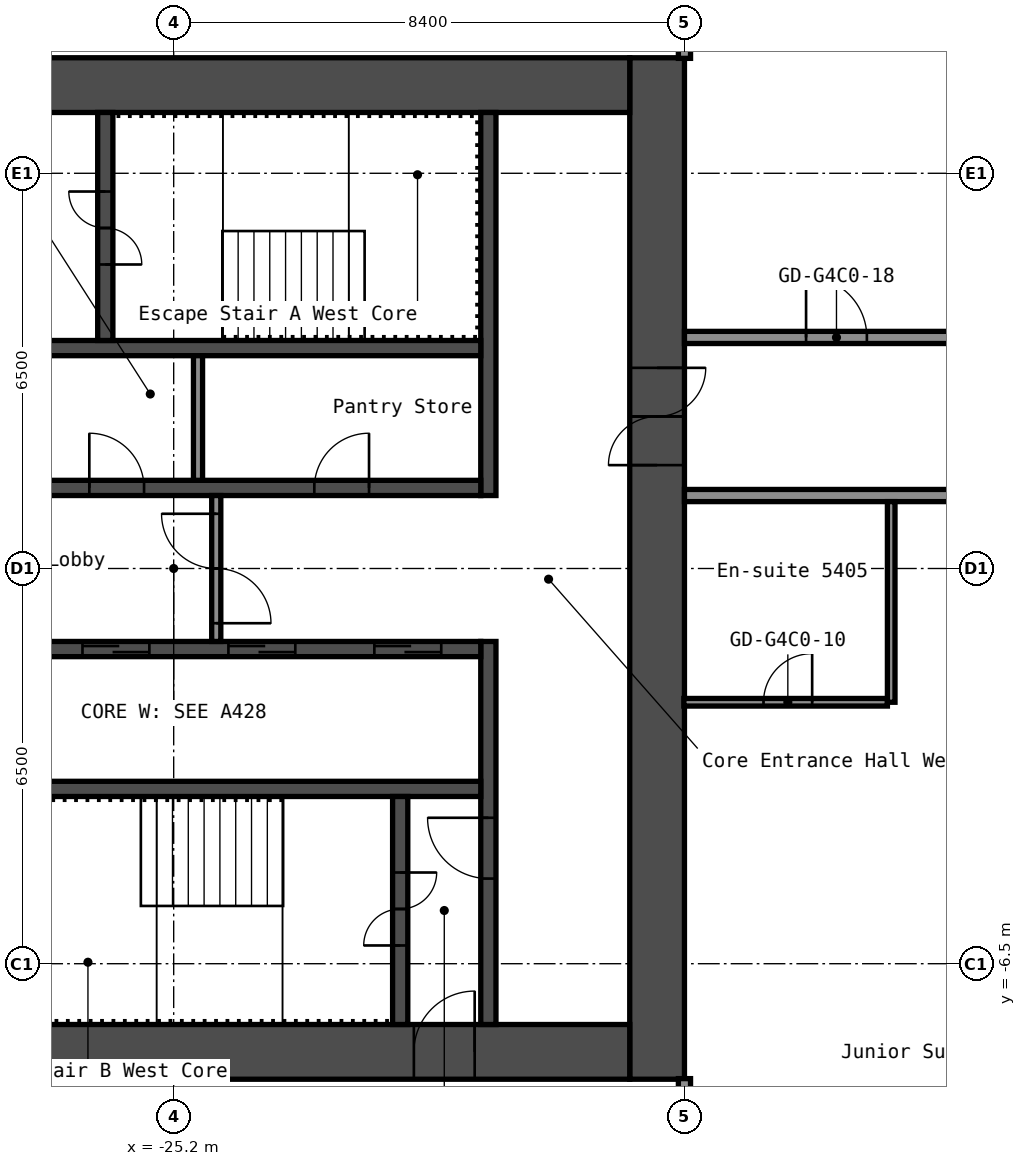
"""IFC4 building model, lengths in metres.
Left out: names, types, materials, properties, quantities, classifications, styles, units other than length and angle.
Written with IfcOpenShell. Run it as: python <this file> out.ifc"""

import sys

from ifc_helpers import new_model, si_unit, direction, frame, frame_2d, origin, place, context, subcontext, project, spatial, rectangle, extrude, element, fill, save


model = new_model("IFC4")
c1 = context("Model", 3, precision=1e-05, world=origin(), true_north=direction((0.0, 1.0)))
c2 = subcontext(c1, "Body", "Model", "MODEL_VIEW")
j1 = project(units=[si_unit("LENGTHUNIT", "METRE"), si_unit("PLANEANGLEUNIT", "RADIAN")], contexts=[c1])
p1 = place(None, origin())
s1 = spatial("IfcSite", under=j1, at=p1, CompositionType="ELEMENT")
p2 = place(p1, origin())
s2 = spatial("IfcBuilding", under=s1, at=p2, CompositionType="ELEMENT")
p3 = place(p2, frame((0.0, 0.0, 193.0)))
s3 = spatial("IfcBuildingStorey", under=s2, at=p3, CompositionType="ELEMENT", Elevation=193.0)
p4 = place(p3, frame((-17.25, -8.4, 0.0), z_axis=(0.0, 0.0, 1.0), x_axis=(0.0, 1.0, 0.0)))
e1 = element("IfcWall", 1, at=p4, inside=s3, PredefinedType="SHEAR", context=c2, shape_type="SweptSolid", body=[
    extrude(rectangle(XDim=16.8, YDim=0.9, at=frame_2d((8.4, 0.0))), origin(), (0.0, 0.0, 1.0), 2.75),
])
p5 = place(p4, frame((10.1, 0.0, 0.0)))
e2 = element("IfcOpeningElement", 2, at=p5, cuts=e1, PredefinedType="OPENING", context=c2, shape_type="SweptSolid", body=[
    extrude(rectangle(XDim=1.6, YDim=2.1, at=frame_2d((0.8, 1.05))), frame((0.0, 0.46, 0.0), z_axis=(0.0, -1.0, 0.0), x_axis=(1.0, 0.0, 0.0)), (0.0, 0.0, 1.0), 0.92),
])
p6 = place(p3, frame((-32.7, 7.95, 0.0), z_axis=(0.0, 0.0, 1.0), x_axis=(1.0, 0.0, 0.0)))
e3 = element("IfcWall", 3, at=p6, inside=s3, PredefinedType="SHEAR", context=c2, shape_type="SweptSolid", body=[
    extrude(rectangle(XDim=15.0, YDim=0.9, at=frame_2d((7.5, 0.0))), origin(), (0.0, 0.0, 1.0), 2.75),
])
p7 = place(p6, frame((3.4, 0.0, 0.0)))
e4 = element("IfcOpeningElement", 4, at=p7, cuts=e3, PredefinedType="OPENING", context=c2, shape_type="SweptSolid", body=[
    extrude(rectangle(XDim=1.2, YDim=2.1, at=frame_2d((0.6, 1.05))), frame((0.0, 0.46, 0.0), z_axis=(0.0, -1.0, 0.0), x_axis=(1.0, 0.0, 0.0)), (0.0, 0.0, 1.0), 0.92),
])
p8 = place(p6, frame((0.75, 0.0, 0.0)))
e5 = element("IfcOpeningElement", 5, at=p8, cuts=e3, PredefinedType="OPENING", context=c2, shape_type="SweptSolid", body=[
    extrude(rectangle(XDim=0.9, YDim=2.1, at=frame_2d((0.45, 1.05))), frame((0.0, 0.46, 0.0), z_axis=(0.0, -1.0, 0.0), x_axis=(1.0, 0.0, 0.0)), (0.0, 0.0, 1.0), 0.92),
])
p9 = place(p3, frame((-32.7, -7.95, 0.0), z_axis=(0.0, 0.0, 1.0), x_axis=(1.0, 0.0, 0.0)))
e6 = element("IfcWall", 6, at=p9, inside=s3, PredefinedType="SHEAR", context=c2, shape_type="SweptSolid", body=[
    extrude(rectangle(XDim=15.0, YDim=0.9, at=frame_2d((7.5, 0.0))), origin(), (0.0, 0.0, 1.0), 2.75),
])
p10 = place(p9, frame((11.45, 0.0, 0.0)))
e7 = element("IfcOpeningElement", 7, at=p10, cuts=e6, PredefinedType="OPENING", context=c2, shape_type="SweptSolid", body=[
    extrude(rectangle(XDim=1.0, YDim=2.1, at=frame_2d((0.5, 1.05))), frame((0.0, 0.46, 0.0), z_axis=(0.0, -1.0, 0.0), x_axis=(1.0, 0.0, 0.0)), (0.0, 0.0, 1.0), 0.92),
])
p11 = place(p3, frame((-20.025, 1.2, 0.0), z_axis=(0.0, 0.0, 1.0), x_axis=(0.0, 1.0, 0.0)))
e8 = element("IfcWall", 8, at=p11, inside=s3, PredefinedType="SHEAR", context=c2, shape_type="SweptSolid", body=[
    extrude(rectangle(XDim=6.3, YDim=0.25, at=frame_2d((3.15, 0.0))), origin(), (0.0, 0.0, 1.0), 2.75),
])
p12 = place(p3, frame((-20.025, -7.5, 0.0), z_axis=(0.0, 0.0, 1.0), x_axis=(0.0, 1.0, 0.0)))
e9 = element("IfcWall", 9, at=p12, inside=s3, PredefinedType="SHEAR", context=c2, shape_type="SweptSolid", body=[
    extrude(rectangle(XDim=6.3, YDim=0.25, at=frame_2d((3.15, 0.0))), origin(), (0.0, 0.0, 1.0), 2.75),
])
p13 = place(p12, frame((2.4, 0.0, 0.0)))
e10 = element("IfcOpeningElement", 10, at=p13, cuts=e9, PredefinedType="OPENING", context=c2, shape_type="SweptSolid", body=[
    extrude(rectangle(XDim=1.0, YDim=2.1, at=frame_2d((0.5, 1.05))), frame((0.0, 0.135, 0.0), z_axis=(0.0, -1.0, 0.0), x_axis=(1.0, 0.0, 0.0)), (0.0, 0.0, 1.0), 0.27),
])
p14 = place(p3, frame((-27.65, 1.325, 0.0), z_axis=(0.0, 0.0, 1.0), x_axis=(1.0, 0.0, 0.0)))
e11 = element("IfcWall", 11, at=p14, inside=s3, PredefinedType="SHEAR", context=c2, shape_type="SweptSolid", body=[
    extrude(rectangle(XDim=7.5, YDim=0.25, at=frame_2d((3.75, 0.0))), origin(), (0.0, 0.0, 1.0), 2.75),
])
p15 = place(p14, frame((4.762, 0.0, 0.0)))
e12 = element("IfcOpeningElement", 12, at=p15, cuts=e11, PredefinedType="OPENING", context=c2, shape_type="SweptSolid", body=[
    extrude(rectangle(XDim=0.9, YDim=2.1, at=frame_2d((0.45, 1.05))), frame((0.0, 0.135, 0.0), z_axis=(0.0, -1.0, 0.0), x_axis=(1.0, 0.0, 0.0)), (0.0, 0.0, 1.0), 0.27),
])
p16 = place(p14, frame((1.062, 0.0, 0.0)))
e13 = element("IfcOpeningElement", 13, at=p16, cuts=e11, PredefinedType="OPENING", context=c2, shape_type="SweptSolid", body=[
    extrude(rectangle(XDim=0.9, YDim=2.1, at=frame_2d((0.45, 1.05))), frame((0.0, 0.135, 0.0), z_axis=(0.0, -1.0, 0.0), x_axis=(1.0, 0.0, 0.0)), (0.0, 0.0, 1.0), 0.27),
])
p17 = place(p3, frame((-27.65, 3.625, 0.0), z_axis=(0.0, 0.0, 1.0), x_axis=(1.0, 0.0, 0.0)))
e14 = element("IfcWall", 14, at=p17, inside=s3, PredefinedType="SHEAR", context=c2, shape_type="SweptSolid", body=[
    extrude(rectangle(XDim=7.5, YDim=0.25, at=frame_2d((3.75, 0.0))), origin(), (0.0, 0.0, 1.0), 2.75),
])
p18 = place(p3, frame((-26.325, 3.75, 0.0), z_axis=(0.0, 0.0, 1.0), x_axis=(0.0, 1.0, 0.0)))
e15 = element("IfcWall", 15, at=p18, inside=s3, PredefinedType="SHEAR", context=c2, shape_type="SweptSolid", body=[
    extrude(rectangle(XDim=3.75, YDim=0.25, at=frame_2d((1.875, 0.0))), origin(), (0.0, 0.0, 1.0), 2.75),
])
p19 = place(p18, frame((1.25, 0.0, 0.0)))
e16 = element("IfcOpeningElement", 16, at=p19, cuts=e15, PredefinedType="OPENING", context=c2, shape_type="SweptSolid", body=[
    extrude(rectangle(XDim=1.2, YDim=2.1, at=frame_2d((0.6, 1.05))), frame((0.0, 0.135, 0.0), z_axis=(0.0, -1.0, 0.0), x_axis=(1.0, 0.0, 0.0)), (0.0, 0.0, 1.0), 0.27),
])
p20 = place(p3, frame((-27.65, -1.325, 0.0), z_axis=(0.0, 0.0, 1.0), x_axis=(1.0, 0.0, 0.0)))
e17 = element("IfcWall", 17, at=p20, inside=s3, PredefinedType="SHEAR", context=c2, shape_type="SweptSolid", body=[
    extrude(rectangle(XDim=7.5, YDim=0.25, at=frame_2d((3.75, 0.0))), origin(), (0.0, 0.0, 1.0), 2.75),
])
p21 = place(p20, frame((5.75, 0.0, 0.0)))
e18 = element("IfcOpeningElement", 18, at=p21, cuts=e17, PredefinedType="OPENING", context=c2, shape_type="SweptSolid", body=[
    extrude(rectangle(XDim=1.1, YDim=2.1, at=frame_2d((0.55, 1.05))), frame((0.0, 0.135, 0.0), z_axis=(0.0, -1.0, 0.0), x_axis=(1.0, 0.0, 0.0)), (0.0, 0.0, 1.0), 0.27),
])
p22 = place(p20, frame((3.35, 0.0, 0.0)))
e19 = element("IfcOpeningElement", 19, at=p22, cuts=e17, PredefinedType="OPENING", context=c2, shape_type="SweptSolid", body=[
    extrude(rectangle(XDim=1.1, YDim=2.1, at=frame_2d((0.55, 1.05))), frame((0.0, 0.135, 0.0), z_axis=(0.0, -1.0, 0.0), x_axis=(1.0, 0.0, 0.0)), (0.0, 0.0, 1.0), 0.27),
])
p23 = place(p20, frame((0.95, 0.0, 0.0)))
e20 = element("IfcOpeningElement", 20, at=p23, cuts=e17, PredefinedType="OPENING", context=c2, shape_type="SweptSolid", body=[
    extrude(rectangle(XDim=1.1, YDim=2.1, at=frame_2d((0.55, 1.05))), frame((0.0, 0.135, 0.0), z_axis=(0.0, -1.0, 0.0), x_axis=(1.0, 0.0, 0.0)), (0.0, 0.0, 1.0), 0.27),
])
p24 = place(p3, frame((-27.65, -3.625, 0.0), z_axis=(0.0, 0.0, 1.0), x_axis=(1.0, 0.0, 0.0)))
e21 = element("IfcWall", 21, at=p24, inside=s3, PredefinedType="SHEAR", context=c2, shape_type="SweptSolid", body=[
    extrude(rectangle(XDim=7.5, YDim=0.25, at=frame_2d((3.75, 0.0))), origin(), (0.0, 0.0, 1.0), 2.75),
])
p25 = place(p3, frame((-21.475, -7.5, 0.0), z_axis=(0.0, 0.0, 1.0), x_axis=(0.0, 1.0, 0.0)))
e22 = element("IfcWall", 22, at=p25, inside=s3, PredefinedType="SHEAR", context=c2, shape_type="SweptSolid", body=[
    extrude(rectangle(XDim=3.75, YDim=0.25, at=frame_2d((1.875, 0.0))), origin(), (0.0, 0.0, 1.0), 2.75),
])
p26 = place(p25, frame((1.3, 0.0, 0.0)))
e23 = element("IfcOpeningElement", 23, at=p26, cuts=e22, PredefinedType="OPENING", context=c2, shape_type="SweptSolid", body=[
    extrude(rectangle(XDim=1.2, YDim=2.1, at=frame_2d((0.6, 1.05))), frame((0.0, 0.135, 0.0), z_axis=(0.0, -1.0, 0.0), x_axis=(1.0, 0.0, 0.0)), (0.0, 0.0, 1.0), 0.27),
])
p27 = place(p3, frame((-24.5, -1.2, 0.0), z_axis=(0.0, 0.0, 1.0), x_axis=(0.0, 1.0, 0.0)))
e24 = element("IfcWall", 24, at=p27, inside=s3, PredefinedType="PARTITIONING", context=c2, shape_type="SweptSolid", body=[
    extrude(rectangle(XDim=2.4, YDim=0.15, at=frame_2d((1.2, 0.0))), origin(), (0.0, 0.0, 1.0), 2.75),
])
p28 = place(p27, frame((0.3, 0.0, 0.0)))
e25 = element("IfcOpeningElement", 25, at=p28, cuts=e24, PredefinedType="OPENING", context=c2, shape_type="SweptSolid", body=[
    extrude(rectangle(XDim=1.8, YDim=2.1, at=frame_2d((0.9, 1.05))), frame((0.0, 0.085, 0.0), z_axis=(0.0, -1.0, 0.0), x_axis=(1.0, 0.0, 0.0)), (0.0, 0.0, 1.0), 0.17),
])
p29 = place(p3, frame((-24.8, 1.45, 0.0), z_axis=(0.0, 0.0, 1.0), x_axis=(0.0, 1.0, 0.0)))
e26 = element("IfcWall", 26, at=p29, inside=s3, PredefinedType="PARTITIONING", context=c2, shape_type="SweptSolid", body=[
    extrude(rectangle(XDim=2.05, YDim=0.15, at=frame_2d((1.025, 0.0))), origin(), (0.0, 0.0, 1.0), 2.75),
])
p30 = place(p3, frame((-16.81, -2.2, 0.0), z_axis=(0.0, 0.0, 1.0), x_axis=(1.0, 0.0, 0.0)))
e27 = element("IfcWall", 27, at=p30, inside=s3, PredefinedType="PARTITIONING", context=c2, shape_type="SweptSolid", body=[
    extrude(rectangle(XDim=3.348, YDim=0.125, at=frame_2d((1.674, 0.0))), origin(), (0.0, 0.0, 1.0), 2.75),
])
p31 = place(p30, frame((1.31, 0.0, 0.0)))
e28 = element("IfcOpeningElement", 28, at=p31, cuts=e27, PredefinedType="OPENING", context=c2, shape_type="SweptSolid", body=[
    extrude(rectangle(XDim=0.8, YDim=2.1, at=frame_2d((0.4, 1.05))), frame((0.0, 0.073, 0.0), z_axis=(0.0, -1.0, 0.0), x_axis=(1.0, 0.0, 0.0)), (0.0, 0.0, 1.0), 0.145),
])
p32 = place(p3, frame((-16.8, 1.2, 0.0), z_axis=(0.0, 0.0, 1.0), x_axis=(1.0, 0.0, 0.0)))
e29 = element("IfcWall", 29, at=p32, inside=s3, PredefinedType="PARTITIONING", context=c2, shape_type="SweptSolid", body=[
    extrude(rectangle(XDim=33.6, YDim=0.2, at=frame_2d((16.8, 0.0))), origin(), (0.0, 0.0, 1.0), 2.75),
])
p33 = place(p32, frame((5.4, 0.0, 0.0)))
e30 = element("IfcOpeningElement", 30, at=p33, cuts=e29, PredefinedType="OPENING", context=c2, shape_type="SweptSolid", body=[
    extrude(rectangle(XDim=1.0, YDim=2.1, at=frame_2d((0.5, 1.05))), frame((0.0, 0.11, 0.0), z_axis=(0.0, -1.0, 0.0), x_axis=(1.0, 0.0, 0.0)), (0.0, 0.0, 1.0), 0.22),
])
p34 = place(p32, frame((11.25, 0.0, 0.0)))
e31 = element("IfcOpeningElement", 31, at=p34, cuts=e29, PredefinedType="OPENING", context=c2, shape_type="SweptSolid", body=[
    extrude(rectangle(XDim=1.0, YDim=2.1, at=frame_2d((0.5, 1.05))), frame((0.0, 0.11, 0.0), z_axis=(0.0, -1.0, 0.0), x_axis=(1.0, 0.0, 0.0)), (0.0, 0.0, 1.0), 0.22),
])
p35 = place(p32, frame((12.95, 0.0, 0.0)))
e32 = element("IfcOpeningElement", 32, at=p35, cuts=e29, PredefinedType="OPENING", context=c2, shape_type="SweptSolid", body=[
    extrude(rectangle(XDim=1.0, YDim=2.1, at=frame_2d((0.5, 1.05))), frame((0.0, 0.11, 0.0), z_axis=(0.0, -1.0, 0.0), x_axis=(1.0, 0.0, 0.0)), (0.0, 0.0, 1.0), 0.22),
])
p36 = place(p32, frame((18.7, 0.0, 0.0)))
e33 = element("IfcOpeningElement", 33, at=p36, cuts=e29, PredefinedType="OPENING", context=c2, shape_type="SweptSolid", body=[
    extrude(rectangle(XDim=0.9, YDim=2.1, at=frame_2d((0.45, 1.05))), frame((0.0, 0.11, 0.0), z_axis=(0.0, -1.0, 0.0), x_axis=(1.0, 0.0, 0.0)), (0.0, 0.0, 1.0), 0.22),
])
p37 = place(p32, frame((22.9, 0.0, 0.0)))
e34 = element("IfcOpeningElement", 34, at=p37, cuts=e29, PredefinedType="OPENING", context=c2, shape_type="SweptSolid", body=[
    extrude(rectangle(XDim=0.9, YDim=2.1, at=frame_2d((0.45, 1.05))), frame((0.0, 0.11, 0.0), z_axis=(0.0, -1.0, 0.0), x_axis=(1.0, 0.0, 0.0)), (0.0, 0.0, 1.0), 0.22),
])
p38 = place(p32, frame((28.05, 0.0, 0.0)))
e35 = element("IfcOpeningElement", 35, at=p38, cuts=e29, PredefinedType="OPENING", context=c2, shape_type="SweptSolid", body=[
    extrude(rectangle(XDim=1.0, YDim=2.1, at=frame_2d((0.5, 1.05))), frame((0.0, 0.11, 0.0), z_axis=(0.0, -1.0, 0.0), x_axis=(1.0, 0.0, 0.0)), (0.0, 0.0, 1.0), 0.22),
])
p39 = place(p32, frame((29.75, 0.0, 0.0)))
e36 = element("IfcOpeningElement", 36, at=p39, cuts=e29, PredefinedType="OPENING", context=c2, shape_type="SweptSolid", body=[
    extrude(rectangle(XDim=1.0, YDim=2.1, at=frame_2d((0.5, 1.05))), frame((0.0, 0.11, 0.0), z_axis=(0.0, -1.0, 0.0), x_axis=(1.0, 0.0, 0.0)), (0.0, 0.0, 1.0), 0.22),
])
p40 = place(p3, frame((-16.8, 3.8, 0.0), z_axis=(0.0, 0.0, 1.0), x_axis=(1.0, 0.0, 0.0)))
e37 = element("IfcWall", 37, at=p40, inside=s3, PredefinedType="PARTITIONING", context=c2, shape_type="SweptSolid", body=[
    extrude(rectangle(XDim=33.6, YDim=0.2, at=frame_2d((16.8, 0.0))), origin(), (0.0, 0.0, 1.0), 2.75),
])
p41 = place(p40, frame((2.0, 0.0, 0.0)))
e38 = element("IfcOpeningElement", 38, at=p41, cuts=e37, PredefinedType="OPENING", context=c2, shape_type="SweptSolid", body=[
    extrude(rectangle(XDim=1.0, YDim=2.1, at=frame_2d((0.5, 1.05))), frame((0.0, 0.11, 0.0), z_axis=(0.0, -1.0, 0.0), x_axis=(1.0, 0.0, 0.0)), (0.0, 0.0, 1.0), 0.22),
])
p42 = place(p40, frame((11.25, 0.0, 0.0)))
e39 = element("IfcOpeningElement", 39, at=p42, cuts=e37, PredefinedType="OPENING", context=c2, shape_type="SweptSolid", body=[
    extrude(rectangle(XDim=1.0, YDim=2.1, at=frame_2d((0.5, 1.05))), frame((0.0, 0.11, 0.0), z_axis=(0.0, -1.0, 0.0), x_axis=(1.0, 0.0, 0.0)), (0.0, 0.0, 1.0), 0.22),
])
p43 = place(p40, frame((12.95, 0.0, 0.0)))
e40 = element("IfcOpeningElement", 40, at=p43, cuts=e37, PredefinedType="OPENING", context=c2, shape_type="SweptSolid", body=[
    extrude(rectangle(XDim=1.0, YDim=2.1, at=frame_2d((0.5, 1.05))), frame((0.0, 0.11, 0.0), z_axis=(0.0, -1.0, 0.0), x_axis=(1.0, 0.0, 0.0)), (0.0, 0.0, 1.0), 0.22),
])
p44 = place(p40, frame((20.5, 0.0, 0.0)))
e41 = element("IfcOpeningElement", 41, at=p44, cuts=e37, PredefinedType="OPENING", context=c2, shape_type="SweptSolid", body=[
    extrude(rectangle(XDim=1.0, YDim=2.1, at=frame_2d((0.5, 1.05))), frame((0.0, 0.11, 0.0), z_axis=(0.0, -1.0, 0.0), x_axis=(1.0, 0.0, 0.0)), (0.0, 0.0, 1.0), 0.22),
])
p45 = place(p40, frame((28.05, 0.0, 0.0)))
e42 = element("IfcOpeningElement", 42, at=p45, cuts=e37, PredefinedType="OPENING", context=c2, shape_type="SweptSolid", body=[
    extrude(rectangle(XDim=1.0, YDim=2.1, at=frame_2d((0.5, 1.05))), frame((0.0, 0.11, 0.0), z_axis=(0.0, -1.0, 0.0), x_axis=(1.0, 0.0, 0.0)), (0.0, 0.0, 1.0), 0.22),
])
p46 = place(p40, frame((29.75, 0.0, 0.0)))
e43 = element("IfcOpeningElement", 43, at=p46, cuts=e37, PredefinedType="OPENING", context=c2, shape_type="SweptSolid", body=[
    extrude(rectangle(XDim=1.0, YDim=2.1, at=frame_2d((0.5, 1.05))), frame((0.0, 0.11, 0.0), z_axis=(0.0, -1.0, 0.0), x_axis=(1.0, 0.0, 0.0)), (0.0, 0.0, 1.0), 0.22),
])
p47 = place(p3, frame((-16.8, -15.55, 0.0), z_axis=(0.0, 0.0, 1.0), x_axis=(0.0, 1.0, 0.0)))
e44 = element("IfcWall", 44, at=p47, inside=s3, PredefinedType="PARTITIONING", context=c2, shape_type="SweptSolid", body=[
    extrude(rectangle(XDim=7.16, YDim=0.2, at=frame_2d((3.58, 0.0))), origin(), (0.0, 0.0, 1.0), 2.75),
])
p48 = place(p3, frame((-16.8, 8.39, 0.0), z_axis=(0.0, 0.0, 1.0), x_axis=(0.0, 1.0, 0.0)))
e45 = element("IfcWall", 45, at=p48, inside=s3, PredefinedType="PARTITIONING", context=c2, shape_type="SweptSolid", body=[
    extrude(rectangle(XDim=12.16, YDim=0.2, at=frame_2d((6.08, 0.0))), origin(), (0.0, 0.0, 1.0), 2.75),
])
p49 = place(p3, frame((-13.4, -2.2, 0.0), z_axis=(0.0, 0.0, 1.0), x_axis=(0.0, 1.0, 0.0)))
e46 = element("IfcWall", 46, at=p49, inside=s3, PredefinedType="PARTITIONING", context=c2, shape_type="SweptSolid", body=[
    extrude(rectangle(XDim=3.3, YDim=0.125, at=frame_2d((1.65, 0.0))), origin(), (0.0, 0.0, 1.0), 2.75),
])
p50 = place(p5, origin())
e47 = element("IfcDoor", 47, at=p50, inside=s3, OperationType="DOUBLE_DOOR_SINGLE_SWING", PredefinedType="DOOR", context=c2, shape_type="SweptSolid", body=[
    extrude(rectangle(XDim=1.6, YDim=2.1, at=frame_2d((0.8, 1.05))), frame((0.0, 0.025, 0.0), z_axis=(0.0, -1.0, 0.0), x_axis=(1.0, 0.0, 0.0)), (0.0, 0.0, 1.0), 0.05),
])
fill(e2, e47)
p51 = place(p10, origin())
e48 = element("IfcDoor", 48, at=p51, inside=s3, OperationType="SINGLE_SWING_LEFT", PredefinedType="DOOR", context=c2, shape_type="SweptSolid", body=[
    extrude(rectangle(XDim=1.0, YDim=2.1, at=frame_2d((0.5, 1.05))), frame((0.0, 0.025, 0.0), z_axis=(0.0, -1.0, 0.0), x_axis=(1.0, 0.0, 0.0)), (0.0, 0.0, 1.0), 0.05),
])
fill(e7, e48)
p52 = place(p19, origin())
e49 = element("IfcDoor", 49, at=p52, inside=s3, OperationType="DOUBLE_DOOR_SINGLE_SWING", PredefinedType="DOOR", context=c2, shape_type="SweptSolid", body=[
    extrude(rectangle(XDim=1.2, YDim=2.1, at=frame_2d((0.6, 1.05))), frame((0.0, 0.025, 0.0), z_axis=(0.0, -1.0, 0.0), x_axis=(1.0, 0.0, 0.0)), (0.0, 0.0, 1.0), 0.05),
])
fill(e16, e49)
p53 = place(p26, origin())
e50 = element("IfcDoor", 50, at=p53, inside=s3, OperationType="DOUBLE_DOOR_SINGLE_SWING", PredefinedType="DOOR", context=c2, shape_type="SweptSolid", body=[
    extrude(rectangle(XDim=1.2, YDim=2.1, at=frame_2d((0.6, 1.05))), frame((0.0, 0.025, 0.0), z_axis=(0.0, -1.0, 0.0), x_axis=(1.0, 0.0, 0.0)), (0.0, 0.0, 1.0), 0.05),
])
fill(e23, e50)
p54 = place(p13, origin())
e51 = element("IfcDoor", 51, at=p54, inside=s3, OperationType="SINGLE_SWING_LEFT", PredefinedType="DOOR", context=c2, shape_type="SweptSolid", body=[
    extrude(rectangle(XDim=1.0, YDim=2.1, at=frame_2d((0.5, 1.05))), frame((0.0, 0.025, 0.0), z_axis=(0.0, -1.0, 0.0), x_axis=(1.0, 0.0, 0.0)), (0.0, 0.0, 1.0), 0.05),
])
fill(e10, e51)
p55 = place(p28, origin())
e52 = element("IfcDoor", 52, at=p55, inside=s3, OperationType="DOUBLE_DOOR_SINGLE_SWING", PredefinedType="DOOR", context=c2, shape_type="SweptSolid", body=[
    extrude(rectangle(XDim=1.8, YDim=2.1, at=frame_2d((0.9, 1.05))), frame((0.0, 0.025, 0.0), z_axis=(0.0, -1.0, 0.0), x_axis=(1.0, 0.0, 0.0)), (0.0, 0.0, 1.0), 0.05),
])
fill(e25, e52)
p56 = place(p15, origin())
e53 = element("IfcDoor", 53, at=p56, inside=s3, OperationType="SINGLE_SWING_LEFT", PredefinedType="DOOR", context=c2, shape_type="SweptSolid", body=[
    extrude(rectangle(XDim=0.9, YDim=2.1, at=frame_2d((0.45, 1.05))), frame((0.0, 0.025, 0.0), z_axis=(0.0, -1.0, 0.0), x_axis=(1.0, 0.0, 0.0)), (0.0, 0.0, 1.0), 0.05),
])
fill(e12, e53)
p57 = place(p16, origin())
e54 = element("IfcDoor", 54, at=p57, inside=s3, OperationType="SINGLE_SWING_RIGHT", PredefinedType="DOOR", context=c2, shape_type="SweptSolid", body=[
    extrude(rectangle(XDim=0.9, YDim=2.1, at=frame_2d((0.45, 1.05))), frame((0.0, 0.025, 0.0), z_axis=(0.0, -1.0, 0.0), x_axis=(1.0, 0.0, 0.0)), (0.0, 0.0, 1.0), 0.05),
])
fill(e13, e54)
p58 = place(p21, origin())
e55 = element("IfcDoor", 55, at=p58, inside=s3, OperationType="DOUBLE_DOOR_SLIDING", PredefinedType="DOOR", context=c2, shape_type="SweptSolid", body=[
    extrude(rectangle(XDim=1.1, YDim=2.1, at=frame_2d((0.55, 1.05))), frame((0.0, 0.025, 0.0), z_axis=(0.0, -1.0, 0.0), x_axis=(1.0, 0.0, 0.0)), (0.0, 0.0, 1.0), 0.05),
])
fill(e18, e55)
p59 = place(p22, origin())
e56 = element("IfcDoor", 56, at=p59, inside=s3, OperationType="DOUBLE_DOOR_SLIDING", PredefinedType="DOOR", context=c2, shape_type="SweptSolid", body=[
    extrude(rectangle(XDim=1.1, YDim=2.1, at=frame_2d((0.55, 1.05))), frame((0.0, 0.025, 0.0), z_axis=(0.0, -1.0, 0.0), x_axis=(1.0, 0.0, 0.0)), (0.0, 0.0, 1.0), 0.05),
])
fill(e19, e56)
p60 = place(p23, origin())
e57 = element("IfcDoor", 57, at=p60, inside=s3, OperationType="DOUBLE_DOOR_SLIDING", PredefinedType="DOOR", context=c2, shape_type="SweptSolid", body=[
    extrude(rectangle(XDim=1.1, YDim=2.1, at=frame_2d((0.55, 1.05))), frame((0.0, 0.025, 0.0), z_axis=(0.0, -1.0, 0.0), x_axis=(1.0, 0.0, 0.0)), (0.0, 0.0, 1.0), 0.05),
])
fill(e20, e57)
p61 = place(p31, origin())
e58 = element("IfcDoor", 58, at=p61, inside=s3, OperationType="SINGLE_SWING_LEFT", PredefinedType="DOOR", context=c2, shape_type="SweptSolid", body=[
    extrude(rectangle(XDim=0.8, YDim=2.1, at=frame_2d((0.4, 1.05))), frame((0.0, 0.025, 0.0), z_axis=(0.0, -1.0, 0.0), x_axis=(1.0, 0.0, 0.0)), (0.0, 0.0, 1.0), 0.05),
])
fill(e28, e58)
p62 = place(p41, origin())
e59 = element("IfcDoor", 59, at=p62, inside=s3, OperationType="SINGLE_SWING_RIGHT", PredefinedType="DOOR", context=c2, shape_type="SweptSolid", body=[
    extrude(rectangle(XDim=1.0, YDim=2.1, at=frame_2d((0.5, 1.05))), frame((0.0, 0.025, 0.0), z_axis=(0.0, -1.0, 0.0), x_axis=(1.0, 0.0, 0.0)), (0.0, 0.0, 1.0), 0.05),
])
fill(e38, e59)
save(model, sys.argv[1])
